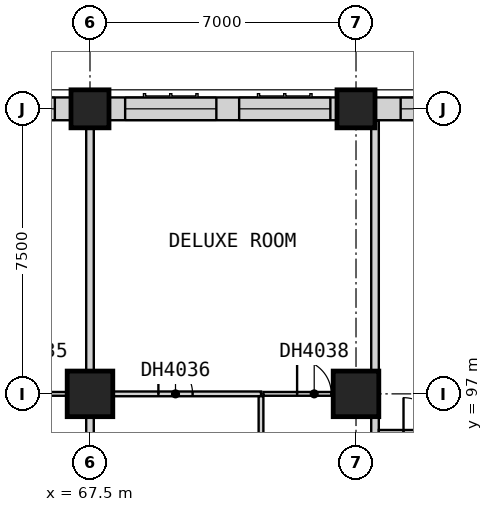
"""IFC4 building model, lengths in metres.
Left out: names, types, materials, properties, quantities, classifications, styles, units other than length and angle.
Written with IfcOpenShell. Run it as: python <this file> out.ifc"""

import sys

from ifc_helpers import new_model, si_unit, direction, frame, frame_2d, origin, origin_2d, place, context, subcontext, project, spatial, rectangle, extrude, element, fill, save


model = new_model("IFC4")
c1 = context("Model", 3, precision=1e-05, world=origin(), true_north=direction((0.0, 1.0)))
c2 = subcontext(c1, "Body", "Model", "MODEL_VIEW")
j1 = project(units=[si_unit("LENGTHUNIT", "METRE"), si_unit("PLANEANGLEUNIT", "RADIAN")], contexts=[c1])
p1 = place(None, origin())
s1 = spatial("IfcSite", under=j1, at=p1, CompositionType="ELEMENT")
p2 = place(p1, origin())
s2 = spatial("IfcBuilding", under=s1, at=p2, CompositionType="ELEMENT")
p3 = place(p2, frame((0.0, 0.0, 44.8)))
s3 = spatial("IfcBuildingStorey", under=s2, at=p3, CompositionType="ELEMENT", Elevation=44.8)
p4 = place(p3, frame((67.5, 97.0, 0.0), z_axis=(0.0, 0.0, 1.0), x_axis=(1.0, 0.0, 0.0)))
e1 = element("IfcColumn", 1, at=p4, inside=s3, PredefinedType="COLUMN", context=c2, shape_type="SweptSolid", body=[
    extrude(rectangle(XDim=1.2, YDim=1.2, at=origin_2d()), origin(), (0.0, 0.0, 1.0), 3.6),
])
p5 = place(p3, frame((67.5, 104.5, 0.0), z_axis=(0.0, 0.0, 1.0), x_axis=(1.0, 0.0, 0.0)))
e2 = element("IfcColumn", 2, at=p5, inside=s3, PredefinedType="COLUMN", context=c2, shape_type="SweptSolid", body=[
    extrude(rectangle(XDim=1.0, YDim=1.0, at=origin_2d()), origin(), (0.0, 0.0, 1.0), 3.6),
])
p6 = place(p3, frame((74.5, 97.0, 0.0), z_axis=(0.0, 0.0, 1.0), x_axis=(1.0, 0.0, 0.0)))
e3 = element("IfcColumn", 3, at=p6, inside=s3, PredefinedType="COLUMN", context=c2, shape_type="SweptSolid", body=[
    extrude(rectangle(XDim=1.2, YDim=1.2, at=origin_2d()), origin(), (0.0, 0.0, 1.0), 3.6),
])
p7 = place(p3, frame((74.5, 104.5, 0.0), z_axis=(0.0, 0.0, 1.0), x_axis=(1.0, 0.0, 0.0)))
e4 = element("IfcColumn", 4, at=p7, inside=s3, PredefinedType="COLUMN", context=c2, shape_type="SweptSolid", body=[
    extrude(rectangle(XDim=1.0, YDim=1.0, at=origin_2d()), origin(), (0.0, 0.0, 1.0), 3.6),
])
p8 = place(p3, frame((81.5, 104.5, 0.0), z_axis=(0.0, 0.0, 1.0), x_axis=(-1.0, 0.0, 0.0)))
e5 = element("IfcWall", 5, at=p8, inside=s3, PredefinedType="SOLIDWALL", context=c2, shape_type="SweptSolid", body=[
    extrude(rectangle(XDim=6.5, YDim=0.6, at=frame_2d((3.25, 0.0))), origin(), (0.0, 0.0, 1.0), 2.85),
])
p9 = place(p8, frame((3.425, 0.0, 0.8)))
e6 = element("IfcOpeningElement", 6, at=p9, cuts=e5, PredefinedType="OPENING", context=c2, shape_type="SweptSolid", body=[
    extrude(rectangle(XDim=2.4, YDim=1.8, at=frame_2d((1.2, 0.9))), frame((0.0, 0.31, 0.0), z_axis=(0.0, -1.0, 0.0), x_axis=(1.0, 0.0, 0.0)), (0.0, 0.0, 1.0), 0.62),
])
p10 = place(p8, frame((0.175, 0.0, 0.8)))
e7 = element("IfcOpeningElement", 7, at=p10, cuts=e5, PredefinedType="OPENING", context=c2, shape_type="SweptSolid", body=[
    extrude(rectangle(XDim=2.4, YDim=1.8, at=frame_2d((1.2, 0.9))), frame((0.0, 0.31, 0.0), z_axis=(0.0, -1.0, 0.0), x_axis=(1.0, 0.0, 0.0)), (0.0, 0.0, 1.0), 0.62),
])
p11 = place(p3, frame((74.0, 104.5, 0.0), z_axis=(0.0, 0.0, 1.0), x_axis=(-1.0, 0.0, 0.0)))
e8 = element("IfcWall", 8, at=p11, inside=s3, PredefinedType="SOLIDWALL", context=c2, shape_type="SweptSolid", body=[
    extrude(rectangle(XDim=6.0, YDim=0.6, at=frame_2d((3.0, 0.0))), origin(), (0.0, 0.0, 1.0), 2.85),
])
p12 = place(p11, frame((3.175, 0.0, 0.8)))
e9 = element("IfcOpeningElement", 9, at=p12, cuts=e8, PredefinedType="OPENING", context=c2, shape_type="SweptSolid", body=[
    extrude(rectangle(XDim=2.4, YDim=1.8, at=frame_2d((1.2, 0.9))), frame((0.0, 0.31, 0.0), z_axis=(0.0, -1.0, 0.0), x_axis=(1.0, 0.0, 0.0)), (0.0, 0.0, 1.0), 0.62),
])
p13 = place(p11, frame((0.175, 0.0, 0.8)))
e10 = element("IfcOpeningElement", 10, at=p13, cuts=e8, PredefinedType="OPENING", context=c2, shape_type="SweptSolid", body=[
    extrude(rectangle(XDim=2.4, YDim=1.8, at=frame_2d((1.2, 0.9))), frame((0.0, 0.31, 0.0), z_axis=(0.0, -1.0, 0.0), x_axis=(1.0, 0.0, 0.0)), (0.0, 0.0, 1.0), 0.62),
])
p14 = place(p3, frame((67.0, 104.5, 0.0), z_axis=(0.0, 0.0, 1.0), x_axis=(-1.0, 0.0, 0.0)))
e11 = element("IfcWall", 11, at=p14, inside=s3, PredefinedType="SOLIDWALL", context=c2, shape_type="SweptSolid", body=[
    extrude(rectangle(XDim=6.5, YDim=0.6, at=frame_2d((3.25, 0.0))), origin(), (0.0, 0.0, 1.0), 2.85),
])
p15 = place(p14, frame((3.675, 0.0, 0.8)))
e12 = element("IfcOpeningElement", 12, at=p15, cuts=e11, PredefinedType="OPENING", context=c2, shape_type="SweptSolid", body=[
    extrude(rectangle(XDim=2.4, YDim=1.8, at=frame_2d((1.2, 0.9))), frame((0.0, 0.31, 0.0), z_axis=(0.0, -1.0, 0.0), x_axis=(1.0, 0.0, 0.0)), (0.0, 0.0, 1.0), 0.62),
])
p16 = place(p14, frame((0.425, 0.0, 0.8)))
e13 = element("IfcOpeningElement", 13, at=p16, cuts=e11, PredefinedType="OPENING", context=c2, shape_type="SweptSolid", body=[
    extrude(rectangle(XDim=2.4, YDim=1.8, at=frame_2d((1.2, 0.9))), frame((0.0, 0.31, 0.0), z_axis=(0.0, -1.0, 0.0), x_axis=(1.0, 0.0, 0.0)), (0.0, 0.0, 1.0), 0.62),
])
p17 = place(p3, frame((67.5, 92.475, 0.0), z_axis=(0.0, 0.0, 1.0), x_axis=(0.0, 1.0, 0.0)))
e14 = element("IfcWall", 14, at=p17, inside=s3, PredefinedType="PARTITIONING", context=c2, shape_type="SweptSolid", body=[
    extrude(rectangle(XDim=12.525, YDim=0.2, at=frame_2d((6.262, 0.0))), origin(), (0.0, 0.0, 1.0), 3.35),
])
p18 = place(p3, frame((75.0, 92.475, 0.0), z_axis=(0.0, 0.0, 1.0), x_axis=(0.0, 1.0, 0.0)))
e15 = element("IfcWall", 15, at=p18, inside=s3, PredefinedType="PARTITIONING", context=c2, shape_type="SweptSolid", body=[
    extrude(rectangle(XDim=11.715, YDim=0.2, at=frame_2d((5.857, 0.0))), origin(), (0.0, 0.0, 1.0), 3.35),
])
p19 = place(p3, frame((75.1, 96.0, 0.0), z_axis=(0.0, 0.0, 1.0), x_axis=(1.0, 0.0, 0.0)))
e16 = element("IfcWall", 16, at=p19, inside=s3, PredefinedType="PARTITIONING", context=c2, shape_type="SweptSolid", body=[
    extrude(rectangle(XDim=7.35, YDim=0.1, at=frame_2d((3.675, 0.0))), origin(), (0.0, 0.0, 1.0), 3.35),
])
p20 = place(p19, frame((0.65, 0.0, 0.0)))
e17 = element("IfcOpeningElement", 17, at=p20, cuts=e16, PredefinedType="OPENING", context=c2, shape_type="SweptSolid", body=[
    extrude(rectangle(XDim=0.9, YDim=2.1, at=frame_2d((0.45, 1.05))), frame((0.0, 0.06, 0.0), z_axis=(0.0, -1.0, 0.0), x_axis=(1.0, 0.0, 0.0)), (0.0, 0.0, 1.0), 0.12),
])
p21 = place(p3, frame((64.562, 97.0, 0.0), z_axis=(0.0, 0.0, 1.0), x_axis=(1.0, 0.0, 0.0)))
e18 = element("IfcWall", 18, at=p21, inside=s3, PredefinedType="PARTITIONING", context=c2, shape_type="SweptSolid", body=[
    extrude(rectangle(XDim=2.837, YDim=0.1, at=frame_2d((1.419, 0.0))), origin(), (0.0, 0.0, 1.0), 3.35),
])
p22 = place(p21, frame((0.988, 0.0, 0.0)))
e19 = element("IfcOpeningElement", 19, at=p22, cuts=e18, PredefinedType="OPENING", context=c2, shape_type="SweptSolid", body=[
    extrude(rectangle(XDim=0.9, YDim=2.1, at=frame_2d((0.45, 1.05))), frame((0.0, 0.06, 0.0), z_axis=(0.0, -1.0, 0.0), x_axis=(1.0, 0.0, 0.0)), (0.0, 0.0, 1.0), 0.12),
])
p23 = place(p3, frame((72.062, 97.0, 0.0), z_axis=(0.0, 0.0, 1.0), x_axis=(1.0, 0.0, 0.0)))
e20 = element("IfcWall", 20, at=p23, inside=s3, PredefinedType="PARTITIONING", context=c2, shape_type="SweptSolid", body=[
    extrude(rectangle(XDim=2.837, YDim=0.1, at=frame_2d((1.419, 0.0))), origin(), (0.0, 0.0, 1.0), 3.35),
])
p24 = place(p23, frame((0.887, 0.0, 0.0)))
e21 = element("IfcOpeningElement", 21, at=p24, cuts=e20, PredefinedType="OPENING", context=c2, shape_type="SweptSolid", body=[
    extrude(rectangle(XDim=0.9, YDim=2.1, at=frame_2d((0.45, 1.05))), frame((0.0, 0.06, 0.0), z_axis=(0.0, -1.0, 0.0), x_axis=(1.0, 0.0, 0.0)), (0.0, 0.0, 1.0), 0.12),
])
p25 = place(p3, frame((67.6, 97.0, 0.0), z_axis=(0.0, 0.0, 1.0), x_axis=(1.0, 0.0, 0.0)))
e22 = element("IfcWall", 22, at=p25, inside=s3, PredefinedType="PARTITIONING", context=c2, shape_type="SweptSolid", body=[
    extrude(rectangle(XDim=4.4, YDim=0.125, at=frame_2d((2.2, 0.0))), origin(), (0.0, 0.0, 1.0), 3.35),
])
p26 = place(p25, frame((1.7, 0.0, 0.0)))
e23 = element("IfcOpeningElement", 23, at=p26, cuts=e22, PredefinedType="OPENING", context=c2, shape_type="SweptSolid", body=[
    extrude(rectangle(XDim=0.9, YDim=2.1, at=frame_2d((0.45, 1.05))), frame((0.0, 0.073, 0.0), z_axis=(0.0, -1.0, 0.0), x_axis=(1.0, 0.0, 0.0)), (0.0, 0.0, 1.0), 0.145),
])
p27 = place(p3, frame((72.0, 92.475, 0.0), z_axis=(0.0, 0.0, 1.0), x_axis=(0.0, 1.0, 0.0)))
e24 = element("IfcWall", 24, at=p27, inside=s3, PredefinedType="PARTITIONING", context=c2, shape_type="SweptSolid", body=[
    extrude(rectangle(XDim=4.462, YDim=0.125, at=frame_2d((2.231, 0.0))), origin(), (0.0, 0.0, 1.0), 3.35),
])
p28 = place(p9, origin())
e25 = element("IfcWindow", 25, at=p28, inside=s3, PartitioningType="SINGLE_PANEL", PredefinedType="WINDOW", context=c2, shape_type="SweptSolid", body=[
    extrude(rectangle(XDim=2.4, YDim=1.8, at=frame_2d((1.2, 0.9))), frame((0.0, -0.07, 0.0), z_axis=(0.0, -1.0, 0.0), x_axis=(1.0, 0.0, 0.0)), (0.0, 0.0, 1.0), 0.06),
])
fill(e6, e25)
p29 = place(p12, origin())
e26 = element("IfcWindow", 26, at=p29, inside=s3, PartitioningType="SINGLE_PANEL", PredefinedType="WINDOW", context=c2, shape_type="SweptSolid", body=[
    extrude(rectangle(XDim=2.4, YDim=1.8, at=frame_2d((1.2, 0.9))), frame((0.0, -0.07, 0.0), z_axis=(0.0, -1.0, 0.0), x_axis=(1.0, 0.0, 0.0)), (0.0, 0.0, 1.0), 0.06),
])
fill(e9, e26)
p30 = place(p13, origin())
e27 = element("IfcWindow", 27, at=p30, inside=s3, PartitioningType="SINGLE_PANEL", PredefinedType="WINDOW", context=c2, shape_type="SweptSolid", body=[
    extrude(rectangle(XDim=2.4, YDim=1.8, at=frame_2d((1.2, 0.9))), frame((0.0, -0.07, 0.0), z_axis=(0.0, -1.0, 0.0), x_axis=(1.0, 0.0, 0.0)), (0.0, 0.0, 1.0), 0.06),
])
fill(e10, e27)
p31 = place(p16, origin())
e28 = element("IfcWindow", 28, at=p31, inside=s3, PartitioningType="SINGLE_PANEL", PredefinedType="WINDOW", context=c2, shape_type="SweptSolid", body=[
    extrude(rectangle(XDim=2.4, YDim=1.8, at=frame_2d((1.2, 0.9))), frame((0.0, -0.07, 0.0), z_axis=(0.0, -1.0, 0.0), x_axis=(1.0, 0.0, 0.0)), (0.0, 0.0, 1.0), 0.06),
])
fill(e13, e28)
p32 = place(p26, origin())
e29 = element("IfcDoor", 29, at=p32, inside=s3, OperationType="SINGLE_SWING_RIGHT", PredefinedType="DOOR", context=c2, shape_type="SweptSolid", body=[
    extrude(rectangle(XDim=0.9, YDim=2.1, at=frame_2d((0.45, 1.05))), frame((0.0, 0.025, 0.0), z_axis=(0.0, -1.0, 0.0), x_axis=(1.0, 0.0, 0.0)), (0.0, 0.0, 1.0), 0.05),
])
fill(e23, e29)
p33 = place(p24, origin())
e30 = element("IfcDoor", 30, at=p33, inside=s3, OperationType="SINGLE_SWING_RIGHT", PredefinedType="DOOR", context=c2, shape_type="SweptSolid", body=[
    extrude(rectangle(XDim=0.9, YDim=2.1, at=frame_2d((0.45, 1.05))), frame((0.0, 0.025, 0.0), z_axis=(0.0, -1.0, 0.0), x_axis=(1.0, 0.0, 0.0)), (0.0, 0.0, 1.0), 0.05),
])
fill(e21, e30)
p34 = place(p20, origin())
e31 = element("IfcDoor", 31, at=p34, inside=s3, OperationType="SINGLE_SWING_LEFT", PredefinedType="DOOR", context=c2, shape_type="SweptSolid", body=[
    extrude(rectangle(XDim=0.9, YDim=2.1, at=frame_2d((0.45, 1.05))), frame((0.0, 0.025, 0.0), z_axis=(0.0, -1.0, 0.0), x_axis=(1.0, 0.0, 0.0)), (0.0, 0.0, 1.0), 0.05),
])
fill(e17, e31)
save(model, sys.argv[1])
